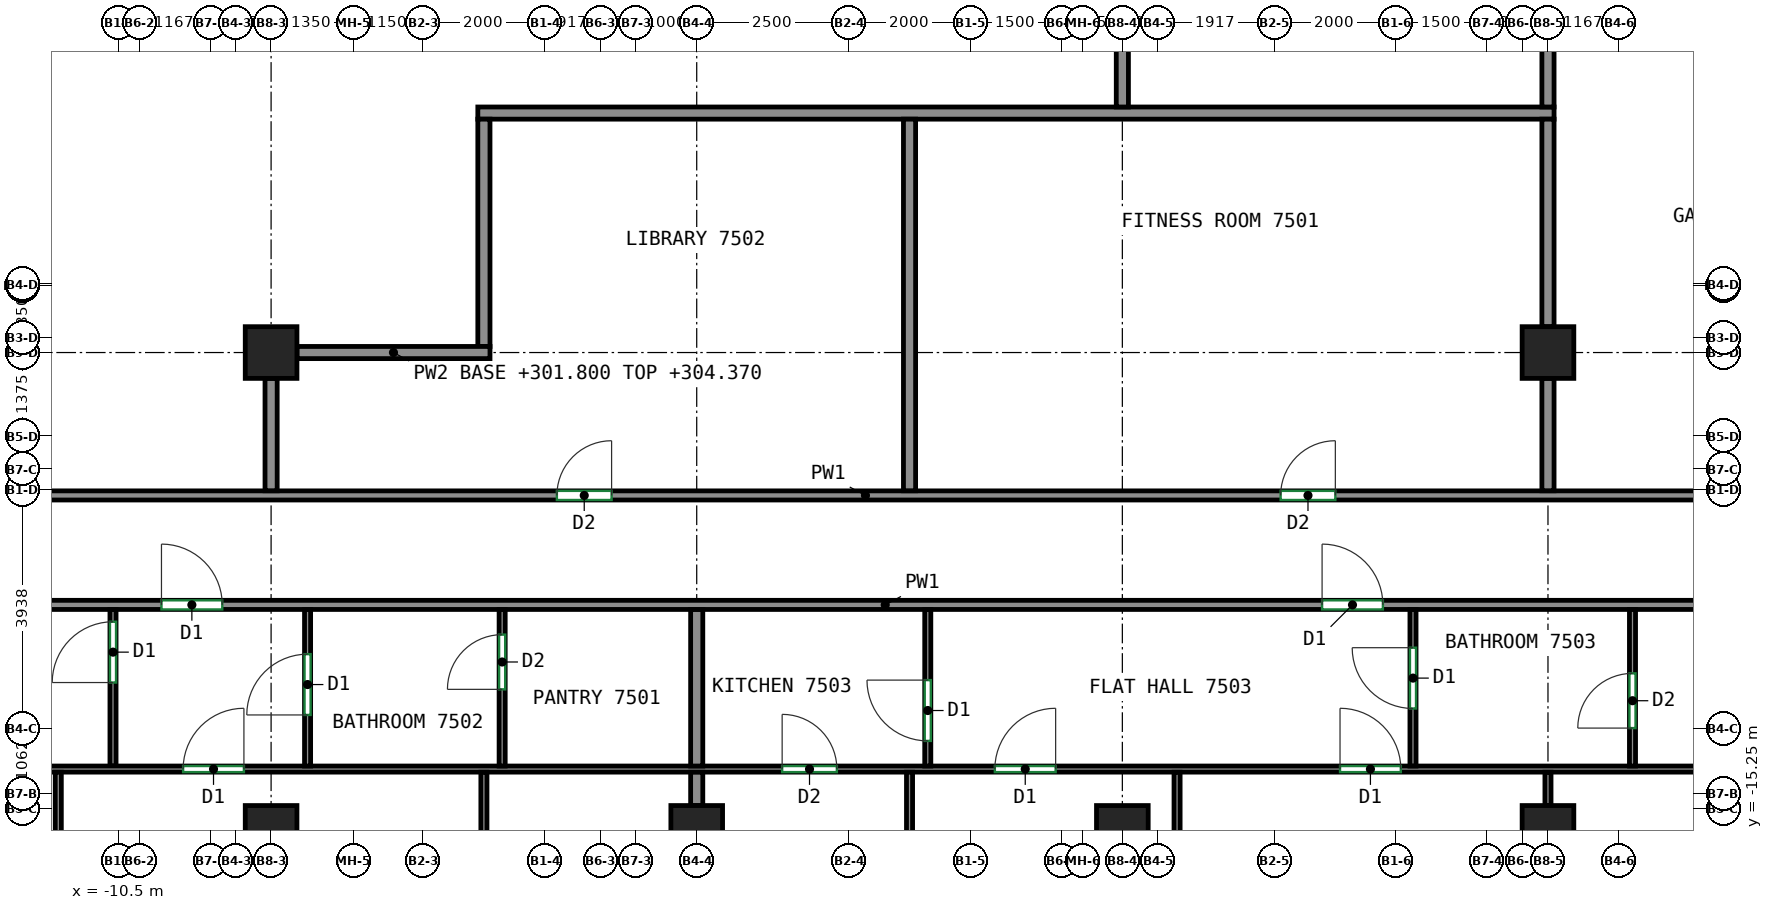
"""IFC4 building model, lengths in metres.
Left out: names, types, materials, properties, quantities, classifications, styles, units other than length and angle.
Written with IfcOpenShell. Run it as: python <this file> out.ifc"""

import sys

from ifc_helpers import new_model, si_unit, direction, frame, frame_2d, origin, origin_2d, place, context, subcontext, project, spatial, rectangle, extrude, source, transform, mapped, element, fill, save


model = new_model("IFC4")
c1 = context("Model", 3, precision=1e-05, world=origin(), true_north=direction((0.0, 1.0)))
c2 = subcontext(c1, "Body", "Model", "MODEL_VIEW")
j1 = project(units=[si_unit("LENGTHUNIT", "METRE"), si_unit("PLANEANGLEUNIT", "RADIAN")], contexts=[c1])
p1 = place(None, origin())
s1 = spatial("IfcSite", under=j1, at=p1, CompositionType="ELEMENT")
p2 = place(p1, origin())
s2 = spatial("IfcBuilding", under=s1, at=p2, CompositionType="ELEMENT")
p3 = place(p2, frame((0.0, 0.0, 301.8)))
s3 = spatial("IfcBuildingStorey", under=s2, at=p3, CompositionType="ELEMENT", Elevation=301.8)
m1 = source(origin(), c2, "Body", "SweptSolid", [
    extrude(rectangle(XDim=0.85, YDim=0.85, at=origin_2d()), origin(), (0.0, 0.0, 1.0), 3.12),
])
for number, where, z_axis, x_axis in (
    (1, (-8.0, -15.625, 0.0), (0.0, 0.0, 1.0), (1.0, 0.0, 0.0)),
    (2, (-8.0, -7.75, 0.0), (0.0, 0.0, 1.0), (1.0, 0.0, 0.0)),
    (3, (-1.0, -15.625, 0.0), (0.0, 0.0, 1.0), (1.0, 0.0, 0.0)),
    (4, (6.0, -15.625, 0.0), (0.0, 0.0, 1.0), (1.0, 0.0, 0.0)),
    (5, (13.0, -15.625, 0.0), (0.0, 0.0, 1.0), (1.0, 0.0, 0.0)),
    (6, (13.0, -7.75, 0.0), (0.0, 0.0, 1.0), (1.0, 0.0, 0.0)),
):
    element("IfcColumn", number, at=place(p3, frame(where, z_axis=z_axis, x_axis=x_axis)), inside=s3, PredefinedType="COLUMN", context=c2, shape_type="MappedRepresentation", body=[
        mapped(m1, transform((0.0, 0.0, 0.0))),
    ])
p4 = place(p3, frame((-13.55, -11.9, 0.0), z_axis=(0.0, 0.0, 1.0), x_axis=(1.0, 0.0, 0.0)))
e7 = element("IfcWall", 7, at=p4, inside=s3, PredefinedType="PARTITIONING", context=c2, shape_type="SweptSolid", body=[
    extrude(rectangle(XDim=31.3, YDim=0.15, at=frame_2d((15.65, 0.0))), origin(), (0.0, 0.0, 1.0), 3.12),
])
p5 = place(p4, frame((3.747, 0.0, 0.0)))
e8 = element("IfcOpeningElement", 8, at=p5, cuts=e7, PredefinedType="OPENING", context=c2, shape_type="SweptSolid", body=[
    extrude(rectangle(XDim=1.0, YDim=2.1, at=frame_2d((0.5, 1.05))), frame((0.0, 0.085, 0.0), z_axis=(0.0, -1.0, 0.0), x_axis=(1.0, 0.0, 0.0)), (0.0, 0.0, 1.0), 0.17),
])
p6 = place(p4, frame((22.835, 0.0, 0.0)))
e9 = element("IfcOpeningElement", 9, at=p6, cuts=e7, PredefinedType="OPENING", context=c2, shape_type="SweptSolid", body=[
    extrude(rectangle(XDim=1.0, YDim=2.1, at=frame_2d((0.5, 1.05))), frame((0.0, 0.085, 0.0), z_axis=(0.0, -1.0, 0.0), x_axis=(1.0, 0.0, 0.0)), (0.0, 0.0, 1.0), 0.17),
])
p7 = place(p3, frame((-13.55, -10.1, 0.0), z_axis=(0.0, 0.0, 1.0), x_axis=(1.0, 0.0, 0.0)))
e10 = element("IfcWall", 10, at=p7, inside=s3, PredefinedType="PARTITIONING", context=c2, shape_type="SweptSolid", body=[
    extrude(rectangle(XDim=30.65, YDim=0.15, at=frame_2d((15.325, 0.0))), origin(), (0.0, 0.0, 1.0), 3.12),
])
p8 = place(p7, frame((10.25, 0.0, 0.0)))
e11 = element("IfcOpeningElement", 11, at=p8, cuts=e10, PredefinedType="OPENING", context=c2, shape_type="SweptSolid", body=[
    extrude(rectangle(XDim=0.9, YDim=2.1, at=frame_2d((0.45, 1.05))), frame((0.0, 0.085, 0.0), z_axis=(0.0, -1.0, 0.0), x_axis=(1.0, 0.0, 0.0)), (0.0, 0.0, 1.0), 0.17),
])
p9 = place(p7, frame((22.153, 0.0, 0.0)))
e12 = element("IfcOpeningElement", 12, at=p9, cuts=e10, PredefinedType="OPENING", context=c2, shape_type="SweptSolid", body=[
    extrude(rectangle(XDim=0.9, YDim=2.1, at=frame_2d((0.45, 1.05))), frame((0.0, 0.085, 0.0), z_axis=(0.0, -1.0, 0.0), x_axis=(1.0, 0.0, 0.0)), (0.0, 0.0, 1.0), 0.17),
])
p10 = place(p3, frame((-10.6, -14.55, 0.0), z_axis=(0.0, 0.0, 1.0), x_axis=(0.0, 1.0, 0.0)))
e13 = element("IfcWall", 13, at=p10, inside=s3, PredefinedType="PARTITIONING", context=c2, shape_type="SweptSolid", body=[
    extrude(rectangle(XDim=2.573, YDim=0.1, at=frame_2d((1.287, 0.0))), origin(), (0.0, 0.0, 1.0), 3.12),
])
p11 = place(p10, frame((1.373, 0.0, 0.0)))
e14 = element("IfcOpeningElement", 14, at=p11, cuts=e13, PredefinedType="OPENING", context=c2, shape_type="SweptSolid", body=[
    extrude(rectangle(XDim=1.0, YDim=2.1, at=frame_2d((0.5, 1.05))), frame((0.0, 0.06, 0.0), z_axis=(0.0, -1.0, 0.0), x_axis=(1.0, 0.0, 0.0)), (0.0, 0.0, 1.0), 0.12),
])
p12 = place(p3, frame((-13.55, -14.6, 0.0), z_axis=(0.0, 0.0, 1.0), x_axis=(1.0, 0.0, 0.0)))
e15 = element("IfcWall", 15, at=p12, inside=s3, PredefinedType="PARTITIONING", context=c2, shape_type="SweptSolid", body=[
    extrude(rectangle(XDim=31.3, YDim=0.1, at=frame_2d((15.65, 0.0))), origin(), (0.0, 0.0, 1.0), 3.12),
])
p13 = place(p12, frame((0.309, 0.0, 0.0)))
e16 = element("IfcOpeningElement", 16, at=p13, cuts=e15, PredefinedType="OPENING", context=c2, shape_type="SweptSolid", body=[
    extrude(rectangle(XDim=0.9, YDim=2.1, at=frame_2d((0.45, 1.05))), frame((0.0, 0.06, 0.0), z_axis=(0.0, -1.0, 0.0), x_axis=(1.0, 0.0, 0.0)), (0.0, 0.0, 1.0), 0.12),
])
p14 = place(p12, frame((4.103, 0.0, 0.0)))
e17 = element("IfcOpeningElement", 17, at=p14, cuts=e15, PredefinedType="OPENING", context=c2, shape_type="SweptSolid", body=[
    extrude(rectangle(XDim=1.0, YDim=2.1, at=frame_2d((0.5, 1.05))), frame((0.0, 0.06, 0.0), z_axis=(0.0, -1.0, 0.0), x_axis=(1.0, 0.0, 0.0)), (0.0, 0.0, 1.0), 0.12),
])
p15 = place(p12, frame((13.955, 0.0, 0.0)))
e18 = element("IfcOpeningElement", 18, at=p15, cuts=e15, PredefinedType="OPENING", context=c2, shape_type="SweptSolid", body=[
    extrude(rectangle(XDim=0.9, YDim=2.1, at=frame_2d((0.45, 1.05))), frame((0.0, 0.06, 0.0), z_axis=(0.0, -1.0, 0.0), x_axis=(1.0, 0.0, 0.0)), (0.0, 0.0, 1.0), 0.12),
])
p16 = place(p12, frame((17.453, 0.0, 0.0)))
e19 = element("IfcOpeningElement", 19, at=p16, cuts=e15, PredefinedType="OPENING", context=c2, shape_type="SweptSolid", body=[
    extrude(rectangle(XDim=1.0, YDim=2.1, at=frame_2d((0.5, 1.05))), frame((0.0, 0.06, 0.0), z_axis=(0.0, -1.0, 0.0), x_axis=(1.0, 0.0, 0.0)), (0.0, 0.0, 1.0), 0.12),
])
p17 = place(p12, frame((23.13, 0.0, 0.0)))
e20 = element("IfcOpeningElement", 20, at=p17, cuts=e15, PredefinedType="OPENING", context=c2, shape_type="SweptSolid", body=[
    extrude(rectangle(XDim=1.0, YDim=2.1, at=frame_2d((0.5, 1.05))), frame((0.0, 0.06, 0.0), z_axis=(0.0, -1.0, 0.0), x_axis=(1.0, 0.0, 0.0)), (0.0, 0.0, 1.0), 0.12),
])
p18 = place(p3, frame((-7.4, -14.55, 0.0), z_axis=(0.0, 0.0, 1.0), x_axis=(0.0, 1.0, 0.0)))
e21 = element("IfcWall", 21, at=p18, inside=s3, PredefinedType="PARTITIONING", context=c2, shape_type="SweptSolid", body=[
    extrude(rectangle(XDim=2.573, YDim=0.1, at=frame_2d((1.287, 0.0))), origin(), (0.0, 0.0, 1.0), 3.12),
])
p19 = place(p18, frame((0.84, 0.0, 0.0)))
e22 = element("IfcOpeningElement", 22, at=p19, cuts=e21, PredefinedType="OPENING", context=c2, shape_type="SweptSolid", body=[
    extrude(rectangle(XDim=1.0, YDim=2.1, at=frame_2d((0.5, 1.05))), frame((0.0, 0.06, 0.0), z_axis=(0.0, -1.0, 0.0), x_axis=(1.0, 0.0, 0.0)), (0.0, 0.0, 1.0), 0.12),
])
p20 = place(p3, frame((-4.2, -14.55, 0.0), z_axis=(0.0, 0.0, 1.0), x_axis=(0.0, 1.0, 0.0)))
e23 = element("IfcWall", 23, at=p20, inside=s3, PredefinedType="PARTITIONING", context=c2, shape_type="SweptSolid", body=[
    extrude(rectangle(XDim=2.573, YDim=0.1, at=frame_2d((1.287, 0.0))), origin(), (0.0, 0.0, 1.0), 3.12),
])
p21 = place(p20, frame((1.261, 0.0, 0.0)))
e24 = element("IfcOpeningElement", 24, at=p21, cuts=e23, PredefinedType="OPENING", context=c2, shape_type="SweptSolid", body=[
    extrude(rectangle(XDim=0.9, YDim=2.1, at=frame_2d((0.45, 1.05))), frame((0.0, 0.06, 0.0), z_axis=(0.0, -1.0, 0.0), x_axis=(1.0, 0.0, 0.0)), (0.0, 0.0, 1.0), 0.12),
])
p22 = place(p3, frame((-1.0, -14.55, 0.0), z_axis=(0.0, 0.0, 1.0), x_axis=(0.0, 1.0, 0.0)))
e25 = element("IfcWall", 25, at=p22, inside=s3, PredefinedType="PARTITIONING", context=c2, shape_type="SweptSolid", body=[
    extrude(rectangle(XDim=2.573, YDim=0.2, at=frame_2d((1.287, 0.0))), origin(), (0.0, 0.0, 1.0), 3.12),
])
p23 = place(p3, frame((-11.5, -23.25, 0.0), z_axis=(0.0, 0.0, 1.0), x_axis=(0.0, 1.0, 0.0)))
e26 = element("IfcWall", 26, at=p23, inside=s3, PredefinedType="PARTITIONING", context=c2, shape_type="SweptSolid", body=[
    extrude(rectangle(XDim=8.598, YDim=0.1, at=frame_2d((4.299, 0.0))), origin(), (0.0, 0.0, 1.0), 3.12),
])
p24 = place(p3, frame((-4.5, -23.25, 0.0), z_axis=(0.0, 0.0, 1.0), x_axis=(0.0, 1.0, 0.0)))
e27 = element("IfcWall", 27, at=p24, inside=s3, PredefinedType="PARTITIONING", context=c2, shape_type="SweptSolid", body=[
    extrude(rectangle(XDim=8.598, YDim=0.1, at=frame_2d((4.299, 0.0))), origin(), (0.0, 0.0, 1.0), 3.12),
])
p25 = place(p24, frame((1.112, 0.0, 0.0)))
e28 = element("IfcOpeningElement", 28, at=p25, cuts=e27, PredefinedType="OPENING", context=c2, shape_type="SweptSolid", body=[
    extrude(rectangle(XDim=0.9, YDim=2.1, at=frame_2d((0.45, 1.05))), frame((0.0, 0.06, 0.0), z_axis=(0.0, -1.0, 0.0), x_axis=(1.0, 0.0, 0.0)), (0.0, 0.0, 1.0), 0.12),
])
p26 = place(p3, frame((-1.0, -15.2, 0.0), z_axis=(0.0, 0.0, 1.0), x_axis=(0.0, 1.0, 0.0)))
e29 = element("IfcWall", 29, at=p26, inside=s3, PredefinedType="PARTITIONING", context=c2, shape_type="SweptSolid", body=[
    extrude(rectangle(XDim=0.548, YDim=0.2, at=frame_2d((0.274, 0.0))), origin(), (0.0, 0.0, 1.0), 3.12),
])
p27 = place(p3, frame((2.8, -14.55, 0.0), z_axis=(0.0, 0.0, 1.0), x_axis=(0.0, 1.0, 0.0)))
e30 = element("IfcWall", 30, at=p27, inside=s3, PredefinedType="PARTITIONING", context=c2, shape_type="SweptSolid", body=[
    extrude(rectangle(XDim=2.573, YDim=0.1, at=frame_2d((1.287, 0.0))), origin(), (0.0, 0.0, 1.0), 3.12),
])
p28 = place(p27, frame((0.413, 0.0, 0.0)))
e31 = element("IfcOpeningElement", 31, at=p28, cuts=e30, PredefinedType="OPENING", context=c2, shape_type="SweptSolid", body=[
    extrude(rectangle(XDim=1.0, YDim=2.1, at=frame_2d((0.5, 1.05))), frame((0.0, 0.06, 0.0), z_axis=(0.0, -1.0, 0.0), x_axis=(1.0, 0.0, 0.0)), (0.0, 0.0, 1.0), 0.12),
])
p29 = place(p3, frame((10.78, -14.55, 0.0), z_axis=(0.0, 0.0, 1.0), x_axis=(0.0, 1.0, 0.0)))
e32 = element("IfcWall", 32, at=p29, inside=s3, PredefinedType="PARTITIONING", context=c2, shape_type="SweptSolid", body=[
    extrude(rectangle(XDim=2.573, YDim=0.1, at=frame_2d((1.287, 0.0))), origin(), (0.0, 0.0, 1.0), 3.12),
])
p30 = place(p29, frame((0.946, 0.0, 0.0)))
e33 = element("IfcOpeningElement", 33, at=p30, cuts=e32, PredefinedType="OPENING", context=c2, shape_type="SweptSolid", body=[
    extrude(rectangle(XDim=1.0, YDim=2.1, at=frame_2d((0.5, 1.05))), frame((0.0, 0.06, 0.0), z_axis=(0.0, -1.0, 0.0), x_axis=(1.0, 0.0, 0.0)), (0.0, 0.0, 1.0), 0.12),
])
p31 = place(p3, frame((14.39, -14.55, 0.0), z_axis=(0.0, 0.0, 1.0), x_axis=(0.0, 1.0, 0.0)))
e34 = element("IfcWall", 34, at=p31, inside=s3, PredefinedType="PARTITIONING", context=c2, shape_type="SweptSolid", body=[
    extrude(rectangle(XDim=2.573, YDim=0.1, at=frame_2d((1.287, 0.0))), origin(), (0.0, 0.0, 1.0), 3.12),
])
p32 = place(p31, frame((0.624, 0.0, 0.0)))
e35 = element("IfcOpeningElement", 35, at=p32, cuts=e34, PredefinedType="OPENING", context=c2, shape_type="SweptSolid", body=[
    extrude(rectangle(XDim=0.9, YDim=2.1, at=frame_2d((0.45, 1.05))), frame((0.0, 0.06, 0.0), z_axis=(0.0, -1.0, 0.0), x_axis=(1.0, 0.0, 0.0)), (0.0, 0.0, 1.0), 0.12),
])
for number, where, z_axis, x_axis in (
    (36, (2.5, -23.25, 0.0), (0.0, 0.0, 1.0), (0.0, 1.0, 0.0)),
    (37, (6.9, -23.25, 0.0), (0.0, 0.0, 1.0), (0.0, 1.0, 0.0)),
):
    element("IfcWall", number, at=place(p3, frame(where, z_axis=z_axis, x_axis=x_axis)), inside=s3, PredefinedType="PARTITIONING", context=c2, shape_type="SweptSolid", body=[
        extrude(rectangle(XDim=8.598, YDim=0.1, at=frame_2d((4.299, 0.0))), origin(), (0.0, 0.0, 1.0), 3.12),
    ])
p33 = place(p3, frame((13.0, -15.2, 0.0), z_axis=(0.0, 0.0, 1.0), x_axis=(0.0, 1.0, 0.0)))
e38 = element("IfcWall", 38, at=p33, inside=s3, PredefinedType="PARTITIONING", context=c2, shape_type="SweptSolid", body=[
    extrude(rectangle(XDim=0.548, YDim=0.1, at=frame_2d((0.274, 0.0))), origin(), (0.0, 0.0, 1.0), 3.12),
])
p34 = place(p3, frame((-4.6, -3.812, 0.0), z_axis=(0.0, 0.0, 1.0), x_axis=(1.0, 0.0, 0.0)))
e39 = element("IfcWall", 39, at=p34, inside=s3, PredefinedType="PARTITIONING", context=c2, shape_type="SweptSolid", body=[
    extrude(rectangle(XDim=17.7, YDim=0.2, at=frame_2d((8.85, 0.0))), origin(), (0.0, 0.0, 1.0), 3.12),
])
p35 = place(p3, frame((-4.5, -7.65, 0.0), z_axis=(0.0, 0.0, 1.0), x_axis=(0.0, 1.0, 0.0)))
e40 = element("IfcWall", 40, at=p35, inside=s3, PredefinedType="PARTITIONING", context=c2, shape_type="SweptSolid", body=[
    extrude(rectangle(XDim=3.738, YDim=0.2, at=frame_2d((1.869, 0.0))), origin(), (0.0, 0.0, 1.0), 3.12),
])
p36 = place(p3, frame((-7.575, -7.75, 0.0), z_axis=(0.0, 0.0, 1.0), x_axis=(1.0, 0.0, 0.0)))
e41 = element("IfcWall", 41, at=p36, inside=s3, PredefinedType="PARTITIONING", context=c2, shape_type="SweptSolid", body=[
    extrude(rectangle(XDim=3.175, YDim=0.2, at=frame_2d((1.587, 0.0))), origin(), (0.0, 0.0, 1.0), 2.57),
])
p37 = place(p3, frame((-8.0, -10.023, 0.0), z_axis=(0.0, 0.0, 1.0), x_axis=(0.0, 1.0, 0.0)))
e42 = element("IfcWall", 42, at=p37, inside=s3, PredefinedType="PARTITIONING", context=c2, shape_type="SweptSolid", body=[
    extrude(rectangle(XDim=1.848, YDim=0.2, at=frame_2d((0.924, 0.0))), origin(), (0.0, 0.0, 1.0), 3.12),
])
p38 = place(p3, frame((6.0, -3.712, 0.0), z_axis=(0.0, 0.0, 1.0), x_axis=(0.0, 1.0, 0.0)))
e43 = element("IfcWall", 43, at=p38, inside=s3, PredefinedType="PARTITIONING", context=c2, shape_type="SweptSolid", body=[
    extrude(rectangle(XDim=3.503, YDim=0.2, at=frame_2d((1.751, 0.0))), origin(), (0.0, 0.0, 1.0), 3.12),
])
p39 = place(p3, frame((2.5, -10.023, 0.0), z_axis=(0.0, 0.0, 1.0), x_axis=(0.0, 1.0, 0.0)))
e44 = element("IfcWall", 44, at=p39, inside=s3, PredefinedType="PARTITIONING", context=c2, shape_type="SweptSolid", body=[
    extrude(rectangle(XDim=6.111, YDim=0.2, at=frame_2d((3.055, 0.0))), origin(), (0.0, 0.0, 1.0), 3.12),
])
p40 = place(p3, frame((13.0, -7.325, 0.0), z_axis=(0.0, 0.0, 1.0), x_axis=(0.0, 1.0, 0.0)))
e45 = element("IfcWall", 45, at=p40, inside=s3, PredefinedType="PARTITIONING", context=c2, shape_type="SweptSolid", body=[
    extrude(rectangle(XDim=3.413, YDim=0.2, at=frame_2d((1.707, 0.0))), origin(), (0.0, 0.0, 1.0), 3.12),
])
p41 = place(p3, frame((13.0, -10.023, 0.0), z_axis=(0.0, 0.0, 1.0), x_axis=(0.0, 1.0, 0.0)))
e46 = element("IfcWall", 46, at=p41, inside=s3, PredefinedType="PARTITIONING", context=c2, shape_type="SweptSolid", body=[
    extrude(rectangle(XDim=1.848, YDim=0.2, at=frame_2d((0.924, 0.0))), origin(), (0.0, 0.0, 1.0), 3.12),
])
p42 = place(p3, frame((13.0, -3.712, 0.0), z_axis=(0.0, 0.0, 1.0), x_axis=(0.0, 1.0, 0.0)))
e47 = element("IfcWall", 47, at=p42, inside=s3, PredefinedType="PARTITIONING", context=c2, shape_type="SweptSolid", body=[
    extrude(rectangle(XDim=3.412, YDim=0.2, at=frame_2d((1.706, 0.0))), origin(), (0.0, 0.0, 1.0), 3.12),
])
p43 = place(p14, origin())
e48 = element("IfcDoor", 48, at=p43, inside=s3, OperationType="SINGLE_SWING_RIGHT", PredefinedType="DOOR", context=c2, shape_type="SweptSolid", body=[
    extrude(rectangle(XDim=1.0, YDim=2.1, at=frame_2d((0.5, 1.05))), frame((0.0, 0.025, 0.0), z_axis=(0.0, -1.0, 0.0), x_axis=(1.0, 0.0, 0.0)), (0.0, 0.0, 1.0), 0.05),
])
fill(e17, e48)
p44 = place(p15, origin())
e49 = element("IfcDoor", 49, at=p44, inside=s3, OperationType="SINGLE_SWING_LEFT", PredefinedType="DOOR", context=c2, shape_type="SweptSolid", body=[
    extrude(rectangle(XDim=0.9, YDim=2.1, at=frame_2d((0.45, 1.05))), frame((0.0, 0.025, 0.0), z_axis=(0.0, -1.0, 0.0), x_axis=(1.0, 0.0, 0.0)), (0.0, 0.0, 1.0), 0.05),
])
fill(e18, e49)
p45 = place(p16, origin())
e50 = element("IfcDoor", 50, at=p45, inside=s3, OperationType="SINGLE_SWING_RIGHT", PredefinedType="DOOR", context=c2, shape_type="SweptSolid", body=[
    extrude(rectangle(XDim=1.0, YDim=2.1, at=frame_2d((0.5, 1.05))), frame((0.0, 0.025, 0.0), z_axis=(0.0, -1.0, 0.0), x_axis=(1.0, 0.0, 0.0)), (0.0, 0.0, 1.0), 0.05),
])
fill(e19, e50)
p46 = place(p17, origin())
e51 = element("IfcDoor", 51, at=p46, inside=s3, OperationType="SINGLE_SWING_LEFT", PredefinedType="DOOR", context=c2, shape_type="SweptSolid", body=[
    extrude(rectangle(XDim=1.0, YDim=2.1, at=frame_2d((0.5, 1.05))), frame((0.0, 0.025, 0.0), z_axis=(0.0, -1.0, 0.0), x_axis=(1.0, 0.0, 0.0)), (0.0, 0.0, 1.0), 0.05),
])
fill(e20, e51)
p47 = place(p28, origin())
e52 = element("IfcDoor", 52, at=p47, inside=s3, OperationType="SINGLE_SWING_RIGHT", PredefinedType="DOOR", context=c2, shape_type="SweptSolid", body=[
    extrude(rectangle(XDim=1.0, YDim=2.1, at=frame_2d((0.5, 1.05))), frame((0.0, 0.025, 0.0), z_axis=(0.0, -1.0, 0.0), x_axis=(1.0, 0.0, 0.0)), (0.0, 0.0, 1.0), 0.05),
])
fill(e31, e52)
p48 = place(p32, origin())
e53 = element("IfcDoor", 53, at=p48, inside=s3, OperationType="SINGLE_SWING_LEFT", PredefinedType="DOOR", context=c2, shape_type="SweptSolid", body=[
    extrude(rectangle(XDim=0.9, YDim=2.1, at=frame_2d((0.45, 1.05))), frame((0.0, 0.025, 0.0), z_axis=(0.0, -1.0, 0.0), x_axis=(1.0, 0.0, 0.0)), (0.0, 0.0, 1.0), 0.05),
])
fill(e35, e53)
p49 = place(p19, origin())
e54 = element("IfcDoor", 54, at=p49, inside=s3, OperationType="SINGLE_SWING_LEFT", PredefinedType="DOOR", context=c2, shape_type="SweptSolid", body=[
    extrude(rectangle(XDim=1.0, YDim=2.1, at=frame_2d((0.5, 1.05))), frame((0.0, 0.025, 0.0), z_axis=(0.0, -1.0, 0.0), x_axis=(1.0, 0.0, 0.0)), (0.0, 0.0, 1.0), 0.05),
])
fill(e22, e54)
p50 = place(p30, origin())
e55 = element("IfcDoor", 55, at=p50, inside=s3, OperationType="SINGLE_SWING_RIGHT", PredefinedType="DOOR", context=c2, shape_type="SweptSolid", body=[
    extrude(rectangle(XDim=1.0, YDim=2.1, at=frame_2d((0.5, 1.05))), frame((0.0, 0.025, 0.0), z_axis=(0.0, -1.0, 0.0), x_axis=(1.0, 0.0, 0.0)), (0.0, 0.0, 1.0), 0.05),
])
fill(e33, e55)
p51 = place(p21, origin())
e56 = element("IfcDoor", 56, at=p51, inside=s3, OperationType="SINGLE_SWING_LEFT", PredefinedType="DOOR", context=c2, shape_type="SweptSolid", body=[
    extrude(rectangle(XDim=0.9, YDim=2.1, at=frame_2d((0.45, 1.05))), frame((0.0, 0.025, 0.0), z_axis=(0.0, -1.0, 0.0), x_axis=(1.0, 0.0, 0.0)), (0.0, 0.0, 1.0), 0.05),
])
fill(e24, e56)
p52 = place(p11, origin())
e57 = element("IfcDoor", 57, at=p52, inside=s3, OperationType="SINGLE_SWING_LEFT", PredefinedType="DOOR", context=c2, shape_type="SweptSolid", body=[
    extrude(rectangle(XDim=1.0, YDim=2.1, at=frame_2d((0.5, 1.05))), frame((0.0, 0.025, 0.0), z_axis=(0.0, -1.0, 0.0), x_axis=(1.0, 0.0, 0.0)), (0.0, 0.0, 1.0), 0.05),
])
fill(e14, e57)
p53 = place(p5, origin())
e58 = element("IfcDoor", 58, at=p53, inside=s3, OperationType="SINGLE_SWING_LEFT", PredefinedType="DOOR", context=c2, shape_type="SweptSolid", body=[
    extrude(rectangle(XDim=1.0, YDim=2.1, at=frame_2d((0.5, 1.05))), frame((0.0, 0.025, 0.0), z_axis=(0.0, -1.0, 0.0), x_axis=(1.0, 0.0, 0.0)), (0.0, 0.0, 1.0), 0.05),
])
fill(e8, e58)
p54 = place(p6, origin())
e59 = element("IfcDoor", 59, at=p54, inside=s3, OperationType="SINGLE_SWING_LEFT", PredefinedType="DOOR", context=c2, shape_type="SweptSolid", body=[
    extrude(rectangle(XDim=1.0, YDim=2.1, at=frame_2d((0.5, 1.05))), frame((0.0, 0.025, 0.0), z_axis=(0.0, -1.0, 0.0), x_axis=(1.0, 0.0, 0.0)), (0.0, 0.0, 1.0), 0.05),
])
fill(e9, e59)
p55 = place(p8, origin())
e60 = element("IfcDoor", 60, at=p55, inside=s3, OperationType="SINGLE_SWING_RIGHT", PredefinedType="DOOR", context=c2, shape_type="SweptSolid", body=[
    extrude(rectangle(XDim=0.9, YDim=2.1, at=frame_2d((0.45, 1.05))), frame((0.0, 0.025, 0.0), z_axis=(0.0, -1.0, 0.0), x_axis=(1.0, 0.0, 0.0)), (0.0, 0.0, 1.0), 0.05),
])
fill(e11, e60)
p56 = place(p9, origin())
e61 = element("IfcDoor", 61, at=p56, inside=s3, OperationType="SINGLE_SWING_RIGHT", PredefinedType="DOOR", context=c2, shape_type="SweptSolid", body=[
    extrude(rectangle(XDim=0.9, YDim=2.1, at=frame_2d((0.45, 1.05))), frame((0.0, 0.025, 0.0), z_axis=(0.0, -1.0, 0.0), x_axis=(1.0, 0.0, 0.0)), (0.0, 0.0, 1.0), 0.05),
])
fill(e12, e61)
save(model, sys.argv[1])
